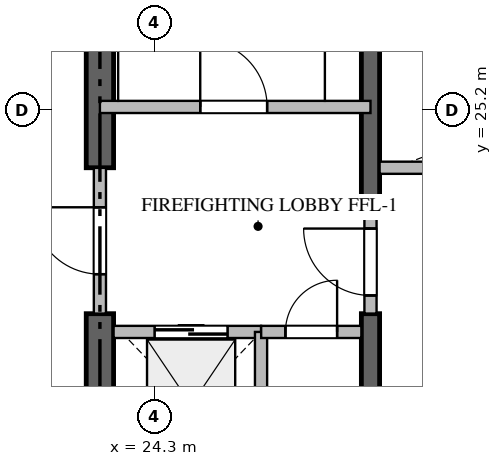
"""IFC4 building model, lengths in metres.
Left out: names, types, materials, properties, quantities, classifications, styles, units other than length and angle.
Written with IfcOpenShell. Run it as: python <this file> out.ifc"""

import sys

from ifc_helpers import new_model, si_unit, direction, frame, frame_2d, origin, place, context, subcontext, project, spatial, rectangle, extrude, source, transform, mapped, element, fill, save


model = new_model("IFC4")
c1 = context("Model", 3, precision=1e-05, world=origin(), true_north=direction((0.0, 1.0)))
c2 = subcontext(c1, "Body", "Model", "MODEL_VIEW")
j1 = project(units=[si_unit("LENGTHUNIT", "METRE"), si_unit("PLANEANGLEUNIT", "RADIAN")], contexts=[c1])
p1 = place(None, origin())
s1 = spatial("IfcSite", under=j1, at=p1, CompositionType="ELEMENT")
p2 = place(p1, origin())
s2 = spatial("IfcBuilding", under=s1, at=p2, CompositionType="ELEMENT")
p3 = place(p2, frame((0.0, 0.0, 71.7)))
s3 = spatial("IfcBuildingStorey", under=s2, at=p3, CompositionType="ELEMENT", Elevation=71.7)
p4 = place(p3, frame((23.4, 17.025, -0.26), z_axis=(0.0, 0.0, 1.0), x_axis=(0.0, 1.0, 0.0)))
e1 = element("IfcWall", 1, at=p4, inside=s3, PredefinedType="SHEAR", context=c2, shape_type="SweptSolid", body=[
    extrude(rectangle(XDim=4.825, YDim=0.45, at=frame_2d((2.413, 0.0))), origin(), (0.0, 0.0, 1.0), 3.748),
])
p5 = place(p3, frame((23.4, 24.25, -0.26), z_axis=(0.0, 0.0, 1.0), x_axis=(0.0, 1.0, 0.0)))
e2 = element("IfcWall", 2, at=p5, inside=s3, PredefinedType="SHEAR", context=c2, shape_type="SweptSolid", body=[
    extrude(rectangle(XDim=9.125, YDim=0.45, at=frame_2d((4.562, 0.0))), origin(), (0.0, 0.0, 1.0), 3.748),
])
p6 = place(p3, frame((27.85, 17.025, -0.26), z_axis=(0.0, 0.0, 1.0), x_axis=(0.0, 1.0, 0.0)))
e3 = element("IfcWall", 3, at=p6, inside=s3, PredefinedType="SHEAR", context=c2, shape_type="SweptSolid", body=[
    extrude(rectangle(XDim=4.825, YDim=0.3, at=frame_2d((2.413, 0.0))), origin(), (0.0, 0.0, 1.0), 3.748),
])
p7 = place(p3, frame((27.85, 23.55, -0.26), z_axis=(0.0, 0.0, 1.0), x_axis=(0.0, 1.0, 0.0)))
e4 = element("IfcWall", 4, at=p7, inside=s3, PredefinedType="SHEAR", context=c2, shape_type="SweptSolid", body=[
    extrude(rectangle(XDim=9.825, YDim=0.3, at=frame_2d((4.913, 0.0))), origin(), (0.0, 0.0, 1.0), 3.748),
])
p8 = place(p3, frame((23.4, 25.25, 0.0), z_axis=(0.0, 0.0, 1.0), x_axis=(1.0, 0.0, 0.0)))
e5 = element("IfcWall", 5, at=p8, inside=s3, PredefinedType="STANDARD", context=c2, shape_type="SweptSolid", body=[
    extrude(rectangle(XDim=4.45, YDim=0.2, at=frame_2d((2.225, 0.0))), origin(), (0.0, 0.0, 1.0), 3.49),
])
p9 = place(p8, frame((1.65, 0.0, 0.0)))
e6 = element("IfcOpeningElement", 6, at=p9, cuts=e5, PredefinedType="OPENING", context=c2, shape_type="SweptSolid", body=[
    extrude(rectangle(XDim=1.1, YDim=2.15, at=frame_2d((0.55, 1.075))), frame((0.0, 0.11, 0.0), z_axis=(0.0, -1.0, 0.0), x_axis=(1.0, 0.0, 0.0)), (0.0, 0.0, 1.0), 0.22),
])
p10 = place(p3, frame((23.625, 21.55, 0.0), z_axis=(0.0, 0.0, 1.0), x_axis=(1.0, 0.0, 0.0)))
e7 = element("IfcWall", 7, at=p10, inside=s3, PredefinedType="STANDARD", context=c2, shape_type="SweptSolid", body=[
    extrude(rectangle(XDim=2.425, YDim=0.2, at=frame_2d((1.212, 0.0))), origin(), (0.0, 0.0, 1.0), 3.49),
])
p11 = place(p10, frame((0.675, 0.0, 0.0)))
e8 = element("IfcOpeningElement", 8, at=p11, cuts=e7, PredefinedType="OPENING", context=c2, shape_type="SweptSolid", body=[
    extrude(rectangle(XDim=1.2, YDim=2.2, at=frame_2d((0.6, 1.1))), frame((0.0, 0.11, 0.0), z_axis=(0.0, -1.0, 0.0), x_axis=(1.0, 0.0, 0.0)), (0.0, 0.0, 1.0), 0.22),
])
p12 = place(p3, frame((28.0, 24.25, 0.0), z_axis=(0.0, 0.0, 1.0), x_axis=(1.0, 0.0, 0.0)))
e9 = element("IfcWall", 9, at=p12, inside=s3, PredefinedType="STANDARD", context=c2, shape_type="SweptSolid", body=[
    extrude(rectangle(XDim=2.425, YDim=0.2, at=frame_2d((1.212, 0.0))), origin(), (0.0, 0.0, 1.0), 3.49),
])
p13 = place(p3, frame((26.05, 19.05, 0.0), z_axis=(0.0, 0.0, 1.0), x_axis=(0.0, 1.0, 0.0)))
e10 = element("IfcWall", 10, at=p13, inside=s3, PredefinedType="STANDARD", context=c2, shape_type="SweptSolid", body=[
    extrude(rectangle(XDim=2.5, YDim=0.2, at=frame_2d((1.25, 0.0))), origin(), (0.0, 0.0, 1.0), 3.49),
])
p14 = place(p3, frame((26.052, 21.55, 0.0), z_axis=(0.0, 0.0, 1.0), x_axis=(1.0, 0.0, 0.0)))
e11 = element("IfcWall", 11, at=p14, inside=s3, PredefinedType="STANDARD", context=c2, shape_type="SweptSolid", body=[
    extrude(rectangle(XDim=1.648, YDim=0.2, at=frame_2d((0.824, 0.0))), origin(), (0.0, 0.0, 1.0), 3.49),
])
p15 = place(p14, frame((0.399, 0.0, 0.0)))
e12 = element("IfcOpeningElement", 12, at=p15, cuts=e11, PredefinedType="OPENING", context=c2, shape_type="SweptSolid", body=[
    extrude(rectangle(XDim=0.85, YDim=2.1, at=frame_2d((0.425, 1.05))), frame((0.0, 0.11, 0.0), z_axis=(0.0, -1.0, 0.0), x_axis=(1.0, 0.0, 0.0)), (0.0, 0.0, 1.0), 0.22),
])
p16 = place(p3, frame((23.4, 21.852, 0.0), z_axis=(0.0, 0.0, 1.0), x_axis=(0.0, 1.0, 0.0)))
e13 = element("IfcWall", 13, at=p16, inside=s3, PredefinedType="STANDARD", context=c2, shape_type="SweptSolid", body=[
    extrude(rectangle(XDim=2.396, YDim=0.2, at=frame_2d((1.198, 0.0))), origin(), (0.0, 0.0, 1.0), 3.49),
])
p17 = place(p16, frame((0.648, 0.0, 0.0)))
e14 = element("IfcOpeningElement", 14, at=p17, cuts=e13, PredefinedType="OPENING", context=c2, shape_type="SweptSolid", body=[
    extrude(rectangle(XDim=1.1, YDim=2.15, at=frame_2d((0.55, 1.075))), frame((0.0, 0.11, 0.0), z_axis=(0.0, -1.0, 0.0), x_axis=(1.0, 0.0, 0.0)), (0.0, 0.0, 1.0), 0.22),
])
p18 = place(p3, frame((27.85, 21.852, 0.0), z_axis=(0.0, 0.0, 1.0), x_axis=(0.0, 1.0, 0.0)))
e15 = element("IfcWall", 15, at=p18, inside=s3, PredefinedType="STANDARD", context=c2, shape_type="SweptSolid", body=[
    extrude(rectangle(XDim=1.696, YDim=0.2, at=frame_2d((0.848, 0.0))), origin(), (0.0, 0.0, 1.0), 3.49),
])
p19 = place(p18, frame((0.298, 0.0, 0.0)))
e16 = element("IfcOpeningElement", 16, at=p19, cuts=e15, PredefinedType="OPENING", context=c2, shape_type="SweptSolid", body=[
    extrude(rectangle(XDim=1.1, YDim=2.15, at=frame_2d((0.55, 1.075))), frame((0.0, 0.11, 0.0), z_axis=(0.0, -1.0, 0.0), x_axis=(1.0, 0.0, 0.0)), (0.0, 0.0, 1.0), 0.22),
])
m1 = source(origin(), c2, "Body", "SweptSolid", [
    extrude(rectangle(XDim=1.1, YDim=2.15, at=frame_2d((0.55, 1.075))), frame((0.0, 0.025, 0.0), z_axis=(0.0, -1.0, 0.0), x_axis=(1.0, 0.0, 0.0)), (0.0, 0.0, 1.0), 0.05),
])
p20 = place(p9, origin())
e17 = element("IfcDoor", 17, at=p20, inside=s3, OperationType="SINGLE_SWING_LEFT", PredefinedType="DOOR", context=c2, shape_type="MappedRepresentation", body=[
    mapped(m1, transform((0.0, 0.0, 0.0), scale=1.0)),
])
fill(e6, e17)
m2 = source(origin(), c2, "Body", "SweptSolid", [
    extrude(rectangle(XDim=1.2, YDim=2.2, at=frame_2d((0.6, 1.1))), frame((0.0, 0.025, 0.0), z_axis=(0.0, -1.0, 0.0), x_axis=(1.0, 0.0, 0.0)), (0.0, 0.0, 1.0), 0.05),
])
p21 = place(p11, origin())
e18 = element("IfcDoor", 18, at=p21, inside=s3, OperationType="DOUBLE_DOOR_SLIDING", PredefinedType="DOOR", context=c2, shape_type="MappedRepresentation", body=[
    mapped(m2, transform((0.0, 0.0, 0.0), scale=1.0)),
])
fill(e8, e18)
m3 = source(origin(), c2, "Body", "SweptSolid", [
    extrude(rectangle(XDim=0.85, YDim=2.1, at=frame_2d((0.425, 1.05))), frame((0.0, 0.025, 0.0), z_axis=(0.0, -1.0, 0.0), x_axis=(1.0, 0.0, 0.0)), (0.0, 0.0, 1.0), 0.05),
])
p22 = place(p15, origin())
e19 = element("IfcDoor", 19, at=p22, inside=s3, OperationType="SINGLE_SWING_RIGHT", PredefinedType="DOOR", context=c2, shape_type="MappedRepresentation", body=[
    mapped(m3, transform((0.0, 0.0, 0.0), scale=1.0)),
])
fill(e12, e19)
p23 = place(p17, origin())
e20 = element("IfcDoor", 20, at=p23, inside=s3, OperationType="SINGLE_SWING_RIGHT", PredefinedType="DOOR", context=c2, shape_type="MappedRepresentation", body=[
    mapped(m1, transform((0.0, 0.0, 0.0), scale=1.0)),
])
fill(e14, e20)
p24 = place(p19, origin())
e21 = element("IfcDoor", 21, at=p24, inside=s3, OperationType="SINGLE_SWING_RIGHT", PredefinedType="DOOR", context=c2, shape_type="MappedRepresentation", body=[
    mapped(m1, transform((0.0, 0.0, 0.0), scale=1.0)),
])
fill(e16, e21)
save(model, sys.argv[1])
